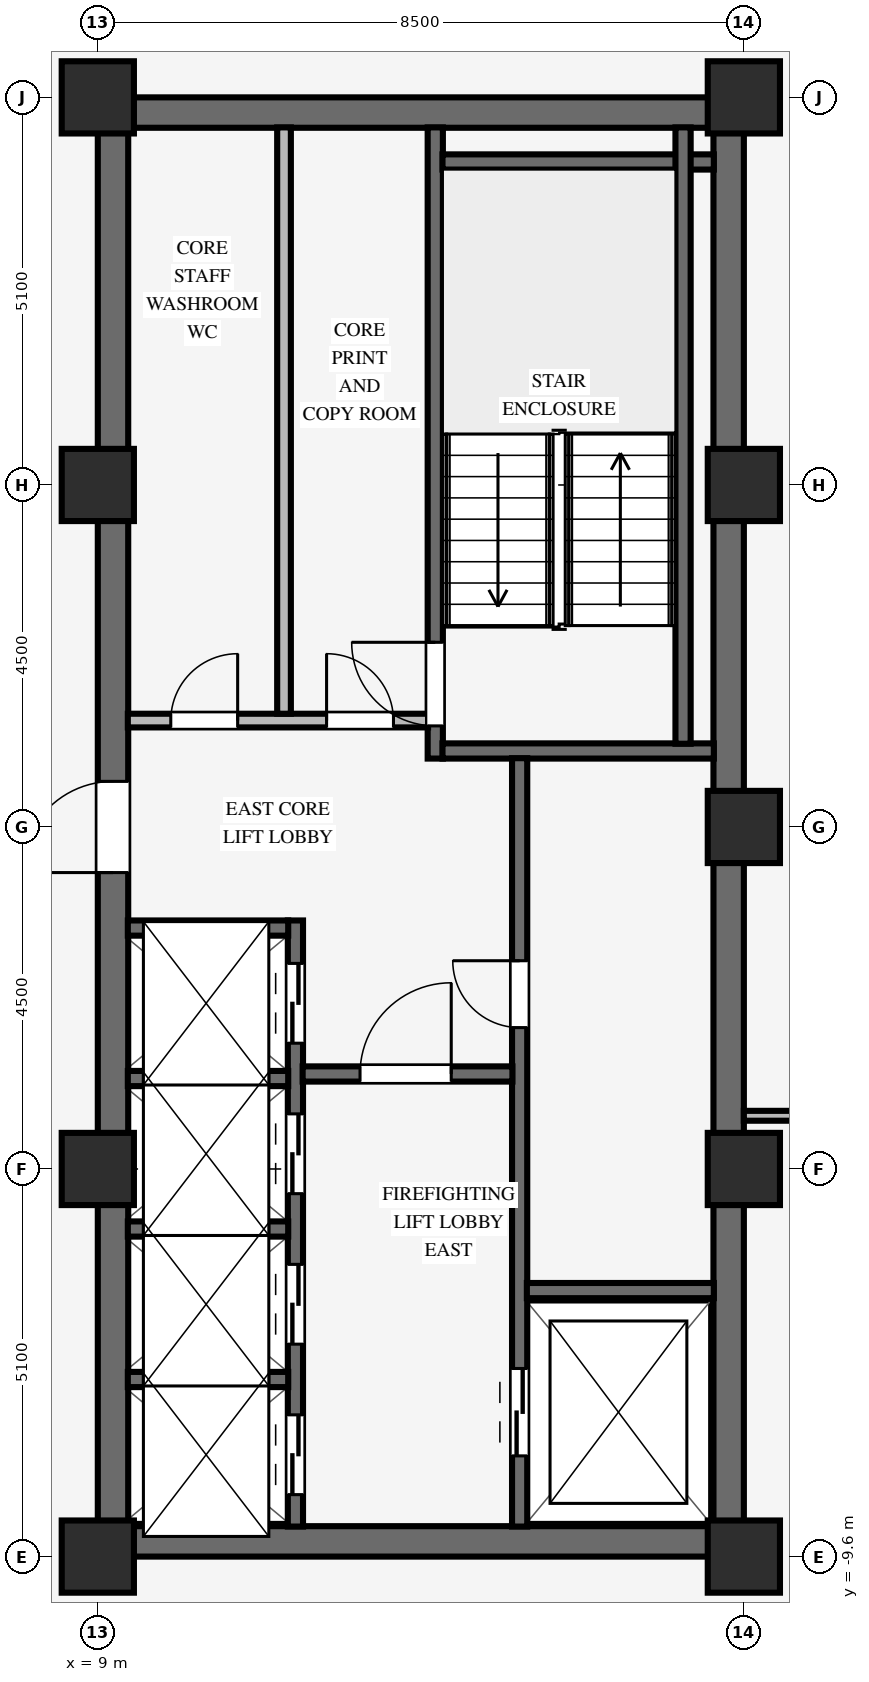
"""IFC4 building model, lengths in metres.
Left out: names, types, materials, properties, quantities, classifications, styles, units other than length and angle.
Written with IfcOpenShell. Run it as: python <this file> out.ifc"""

import sys

from ifc_helpers import new_model, si_unit, direction, frame, frame_2d, origin, origin_2d, place, context, subcontext, project, spatial, rectangle, extrude, source, transform, mapped, element, fill, save


model = new_model("IFC4")
c1 = context("Model", 3, precision=1e-05, world=origin(), true_north=direction((0.0, 1.0)))
c2 = subcontext(c1, "Body", "Model", "MODEL_VIEW")
j1 = project(units=[si_unit("LENGTHUNIT", "METRE"), si_unit("PLANEANGLEUNIT", "RADIAN")], contexts=[c1])
p1 = place(None, origin())
s1 = spatial("IfcSite", under=j1, at=p1, CompositionType="ELEMENT")
p2 = place(p1, origin())
s2 = spatial("IfcBuilding", under=s1, at=p2, CompositionType="ELEMENT")
p3 = place(p2, frame((0.0, 0.0, 167.65)))
s3 = spatial("IfcBuildingStorey", under=s2, at=p3, CompositionType="ELEMENT", Elevation=167.65)
for number, where, z_axis, x_axis in (
    (1, (9.0, -9.4, 0.0), (0.0, 0.0, 1.0), (1.0, 0.0, 0.0)),
    (2, (9.0, 9.4, 0.0), (0.0, 0.0, 1.0), (1.0, 0.0, 0.0)),
):
    element("IfcWall", number, at=place(p3, frame(where, z_axis=z_axis, x_axis=x_axis)), inside=s3, PredefinedType="SHEAR", context=c2, shape_type="SweptSolid", body=[
        extrude(rectangle(XDim=8.5, YDim=0.4, at=frame_2d((4.25, 0.0))), origin(), (0.0, 0.0, 1.0), 3.37),
    ])
p4 = place(p3, frame((9.2, -9.205, 0.0), z_axis=(0.0, 0.0, 1.0), x_axis=(0.0, 1.0, 0.0)))
e3 = element("IfcWall", 3, at=p4, inside=s3, PredefinedType="SHEAR", context=c2, shape_type="SweptSolid", body=[
    extrude(rectangle(XDim=18.41, YDim=0.4, at=frame_2d((9.205, 0.0))), origin(), (0.0, 0.0, 1.0), 3.37),
])
p5 = place(p4, frame((8.605, 0.0, 0.0)))
e4 = element("IfcOpeningElement", 4, at=p5, cuts=e3, PredefinedType="OPENING", context=c2, shape_type="SweptSolid", body=[
    extrude(rectangle(XDim=1.2, YDim=2.15, at=frame_2d((0.6, 1.075))), frame((0.0, 0.21, 0.0), z_axis=(0.0, -1.0, 0.0), x_axis=(1.0, 0.0, 0.0)), (0.0, 0.0, 1.0), 0.42),
])
p6 = place(p3, frame((17.3, -9.205, 0.0), z_axis=(0.0, 0.0, 1.0), x_axis=(0.0, 1.0, 0.0)))
e5 = element("IfcWall", 5, at=p6, inside=s3, PredefinedType="SHEAR", context=c2, shape_type="SweptSolid", body=[
    extrude(rectangle(XDim=18.41, YDim=0.4, at=frame_2d((9.205, 0.0))), origin(), (0.0, 0.0, 1.0), 3.37),
])
for number, where, z_axis, x_axis in (
    (6, (9.0, -9.6, 0.0), (0.0, 0.0, 1.0), (1.0, 0.0, 0.0)),
    (7, (9.0, -4.5, 0.0), (0.0, 0.0, 1.0), (1.0, 0.0, 0.0)),
    (8, (9.0, 4.5, 0.0), (0.0, 0.0, 1.0), (1.0, 0.0, 0.0)),
    (9, (9.0, 9.6, 0.0), (0.0, 0.0, 1.0), (1.0, 0.0, 0.0)),
    (10, (17.5, -9.6, 0.0), (0.0, 0.0, 1.0), (1.0, 0.0, 0.0)),
    (11, (17.5, -4.5, 0.0), (0.0, 0.0, 1.0), (1.0, 0.0, 0.0)),
    (12, (17.5, 4.5, 0.0), (0.0, 0.0, 1.0), (1.0, 0.0, 0.0)),
    (13, (17.5, 9.6, 0.0), (0.0, 0.0, 1.0), (1.0, 0.0, 0.0)),
    (14, (17.5, 0.0, 0.0), (0.0, 0.0, 1.0), (1.0, 0.0, 0.0)),
):
    element("IfcColumn", number, at=place(p3, frame(where, z_axis=z_axis, x_axis=x_axis)), inside=s3, PredefinedType="COLUMN", context=c2, shape_type="SweptSolid", body=[
        extrude(rectangle(XDim=0.95, YDim=0.95, at=origin_2d()), origin(), (0.0, 0.0, 1.0), 3.37),
    ])
p7 = place(p3, frame((13.44, 0.9, 0.0), z_axis=(0.0, 0.0, 1.0), x_axis=(0.0, 1.0, 0.0)))
e15 = element("IfcWall", 15, at=p7, inside=s3, PredefinedType="SHEAR", context=c2, shape_type="SweptSolid", body=[
    extrude(rectangle(XDim=8.305, YDim=0.2, at=frame_2d((4.153, 0.0))), origin(), (0.0, 0.0, 1.0), 3.37),
])
p8 = place(p7, frame((0.43, 0.0, 0.0)))
e16 = element("IfcOpeningElement", 16, at=p8, cuts=e15, PredefinedType="OPENING", context=c2, shape_type="SweptSolid", body=[
    extrude(rectangle(XDim=1.1, YDim=2.15, at=frame_2d((0.55, 1.075))), frame((0.0, 0.11, 0.0), z_axis=(0.0, -1.0, 0.0), x_axis=(1.0, 0.0, 0.0)), (0.0, 0.0, 1.0), 0.22),
])
for number, where, z_axis, x_axis in (
    (17, (13.535, 1.0, 0.0), (0.0, 0.0, 1.0), (1.0, 0.0, 0.0)),
    (18, (13.535, 8.75, 0.0), (0.0, 0.0, 1.0), (1.0, 0.0, 0.0)),
):
    element("IfcWall", number, at=place(p3, frame(where, z_axis=z_axis, x_axis=x_axis)), inside=s3, PredefinedType="SHEAR", context=c2, shape_type="SweptSolid", body=[
        extrude(rectangle(XDim=3.57, YDim=0.2, at=frame_2d((1.785, 0.0))), origin(), (0.0, 0.0, 1.0), 3.37),
    ])
p9 = place(p3, frame((16.7, 1.095, 0.0), z_axis=(0.0, 0.0, 1.0), x_axis=(0.0, 1.0, 0.0)))
e19 = element("IfcWall", 19, at=p9, inside=s3, PredefinedType="SHEAR", context=c2, shape_type="SweptSolid", body=[
    extrude(rectangle(XDim=8.11, YDim=0.2, at=frame_2d((4.055, 0.0))), origin(), (0.0, 0.0, 1.0), 3.37),
])
p10 = place(p3, frame((14.55, -9.205, 0.0), z_axis=(0.0, 0.0, 1.0), x_axis=(0.0, 1.0, 0.0)))
e20 = element("IfcWall", 20, at=p10, inside=s3, PredefinedType="SHEAR", context=c2, shape_type="SweptSolid", body=[
    extrude(rectangle(XDim=10.11, YDim=0.2, at=frame_2d((5.055, 0.0))), origin(), (0.0, 0.0, 1.0), 3.37),
])
p11 = place(p10, frame((6.565, 0.0, 0.0)))
e21 = element("IfcOpeningElement", 21, at=p11, cuts=e20, PredefinedType="OPENING", context=c2, shape_type="SweptSolid", body=[
    extrude(rectangle(XDim=0.88, YDim=2.1, at=frame_2d((0.44, 1.05))), frame((0.0, 0.11, 0.0), z_axis=(0.0, -1.0, 0.0), x_axis=(1.0, 0.0, 0.0)), (0.0, 0.0, 1.0), 0.22),
])
p12 = place(p10, frame((0.93, 0.0, 0.0)))
e22 = element("IfcOpeningElement", 22, at=p12, cuts=e20, PredefinedType="OPENING", context=c2, shape_type="SweptSolid", body=[
    extrude(rectangle(XDim=1.15, YDim=2.15, at=frame_2d((0.575, 1.075))), frame((0.0, 0.11, 0.0), z_axis=(0.0, -1.0, 0.0), x_axis=(1.0, 0.0, 0.0)), (0.0, 0.0, 1.0), 0.22),
])
p13 = place(p3, frame((14.645, -6.1, 0.0), z_axis=(0.0, 0.0, 1.0), x_axis=(1.0, 0.0, 0.0)))
e23 = element("IfcWall", 23, at=p13, inside=s3, PredefinedType="SHEAR", context=c2, shape_type="SweptSolid", body=[
    extrude(rectangle(XDim=2.46, YDim=0.2, at=frame_2d((1.23, 0.0))), origin(), (0.0, 0.0, 1.0), 3.37),
])
p14 = place(p3, frame((11.6, -9.205, 0.0), z_axis=(0.0, 0.0, 1.0), x_axis=(0.0, 1.0, 0.0)))
e24 = element("IfcWall", 24, at=p14, inside=s3, PredefinedType="SHEAR", context=c2, shape_type="SweptSolid", body=[
    extrude(rectangle(XDim=7.975, YDim=0.2, at=frame_2d((3.988, 0.0))), origin(), (0.0, 0.0, 1.0), 3.37),
])
p15 = place(p14, frame((0.42, 0.0, 0.0)))
e25 = element("IfcOpeningElement", 25, at=p15, cuts=e24, PredefinedType="OPENING", context=c2, shape_type="SweptSolid", body=[
    extrude(rectangle(XDim=1.05, YDim=2.15, at=frame_2d((0.525, 1.075))), frame((0.0, 0.11, 0.0), z_axis=(0.0, -1.0, 0.0), x_axis=(1.0, 0.0, 0.0)), (0.0, 0.0, 1.0), 0.22),
])
p16 = place(p14, frame((2.4, 0.0, 0.0)))
e26 = element("IfcOpeningElement", 26, at=p16, cuts=e24, PredefinedType="OPENING", context=c2, shape_type="SweptSolid", body=[
    extrude(rectangle(XDim=1.05, YDim=2.15, at=frame_2d((0.525, 1.075))), frame((0.0, 0.11, 0.0), z_axis=(0.0, -1.0, 0.0), x_axis=(1.0, 0.0, 0.0)), (0.0, 0.0, 1.0), 0.22),
])
p17 = place(p14, frame((4.38, 0.0, 0.0)))
e27 = element("IfcOpeningElement", 27, at=p17, cuts=e24, PredefinedType="OPENING", context=c2, shape_type="SweptSolid", body=[
    extrude(rectangle(XDim=1.05, YDim=2.15, at=frame_2d((0.525, 1.075))), frame((0.0, 0.11, 0.0), z_axis=(0.0, -1.0, 0.0), x_axis=(1.0, 0.0, 0.0)), (0.0, 0.0, 1.0), 0.22),
])
p18 = place(p14, frame((6.36, 0.0, 0.0)))
e28 = element("IfcOpeningElement", 28, at=p18, cuts=e24, PredefinedType="OPENING", context=c2, shape_type="SweptSolid", body=[
    extrude(rectangle(XDim=1.05, YDim=2.15, at=frame_2d((0.525, 1.075))), frame((0.0, 0.11, 0.0), z_axis=(0.0, -1.0, 0.0), x_axis=(1.0, 0.0, 0.0)), (0.0, 0.0, 1.0), 0.22),
])
p19 = place(p3, frame((11.695, -3.25, 0.0), z_axis=(0.0, 0.0, 1.0), x_axis=(1.0, 0.0, 0.0)))
e29 = element("IfcWall", 29, at=p19, inside=s3, PredefinedType="SHEAR", context=c2, shape_type="SweptSolid", body=[
    extrude(rectangle(XDim=2.76, YDim=0.2, at=frame_2d((1.38, 0.0))), origin(), (0.0, 0.0, 1.0), 3.37),
])
p20 = place(p19, frame((0.755, 0.0, 0.0)))
e30 = element("IfcOpeningElement", 30, at=p20, cuts=e29, PredefinedType="OPENING", context=c2, shape_type="SweptSolid", body=[
    extrude(rectangle(XDim=1.2, YDim=2.15, at=frame_2d((0.6, 1.075))), frame((0.0, 0.11, 0.0), z_axis=(0.0, -1.0, 0.0), x_axis=(1.0, 0.0, 0.0)), (0.0, 0.0, 1.0), 0.22),
])
for number, where, z_axis, x_axis in (
    (31, (9.395, -7.27, 0.0), (0.0, 0.0, 1.0), (1.0, 0.0, 0.0)),
    (32, (9.395, -5.29, 0.0), (0.0, 0.0, 1.0), (1.0, 0.0, 0.0)),
    (33, (9.395, -3.31, 0.0), (0.0, 0.0, 1.0), (1.0, 0.0, 0.0)),
    (34, (9.395, -1.33, 0.0), (0.0, 0.0, 1.0), (1.0, 0.0, 0.0)),
):
    element("IfcWall", number, at=place(p3, frame(where, z_axis=z_axis, x_axis=x_axis)), inside=s3, PredefinedType="SHEAR", context=c2, shape_type="SweptSolid", body=[
        extrude(rectangle(XDim=2.11, YDim=0.2, at=frame_2d((1.055, 0.0))), origin(), (0.0, 0.0, 1.0), 3.37),
    ])
p21 = place(p3, frame((9.395, 1.4, 0.0), z_axis=(0.0, 0.0, 1.0), x_axis=(1.0, 0.0, 0.0)))
e35 = element("IfcWall", 35, at=p21, inside=s3, PredefinedType="PARTITIONING", context=c2, shape_type="SweptSolid", body=[
    extrude(rectangle(XDim=3.95, YDim=0.18, at=frame_2d((1.975, 0.0))), origin(), (0.0, 0.0, 1.0), 3.36),
])
p22 = place(p21, frame((0.565, 0.0, 0.0)))
e36 = element("IfcOpeningElement", 36, at=p22, cuts=e35, PredefinedType="OPENING", context=c2, shape_type="SweptSolid", body=[
    extrude(rectangle(XDim=0.88, YDim=2.1, at=frame_2d((0.44, 1.05))), frame((0.0, 0.1, 0.0), z_axis=(0.0, -1.0, 0.0), x_axis=(1.0, 0.0, 0.0)), (0.0, 0.0, 1.0), 0.2),
])
p23 = place(p21, frame((2.615, 0.0, 0.0)))
e37 = element("IfcOpeningElement", 37, at=p23, cuts=e35, PredefinedType="OPENING", context=c2, shape_type="SweptSolid", body=[
    extrude(rectangle(XDim=0.88, YDim=2.1, at=frame_2d((0.44, 1.05))), frame((0.0, 0.1, 0.0), z_axis=(0.0, -1.0, 0.0), x_axis=(1.0, 0.0, 0.0)), (0.0, 0.0, 1.0), 0.2),
])
p24 = place(p3, frame((11.45, 1.49, 0.0), z_axis=(0.0, 0.0, 1.0), x_axis=(0.0, 1.0, 0.0)))
e38 = element("IfcWall", 38, at=p24, inside=s3, PredefinedType="PARTITIONING", context=c2, shape_type="SweptSolid", body=[
    extrude(rectangle(XDim=7.715, YDim=0.18, at=frame_2d((3.857, 0.0))), origin(), (0.0, 0.0, 1.0), 3.36),
])
p25 = place(p3, frame((17.5, -3.8, 0.0), z_axis=(0.0, 0.0, 1.0), x_axis=(1.0, 0.0, 0.0)))
e39 = element("IfcWall", 39, at=p25, inside=s3, PredefinedType="PARTITIONING", context=c2, shape_type="SweptSolid", body=[
    extrude(rectangle(XDim=4.79, YDim=0.13, at=frame_2d((2.395, 0.0))), origin(), (0.0, 0.0, 1.0), 3.36),
])
m1 = source(origin(), c2, "Body", "SweptSolid", [
    extrude(rectangle(XDim=1.1, YDim=2.15, at=frame_2d((0.55, 1.075))), frame((0.0, 0.025, 0.0), z_axis=(0.0, -1.0, 0.0), x_axis=(1.0, 0.0, 0.0)), (0.0, 0.0, 1.0), 0.05),
])
p26 = place(p8, origin())
e40 = element("IfcDoor", 40, at=p26, inside=s3, OperationType="SINGLE_SWING_RIGHT", PredefinedType="DOOR", context=c2, shape_type="MappedRepresentation", body=[
    mapped(m1, transform((0.0, 0.0, 0.0), scale=1.0)),
])
fill(e16, e40)
m2 = source(origin(), c2, "Body", "SweptSolid", [
    extrude(rectangle(XDim=0.88, YDim=2.1, at=frame_2d((0.44, 1.05))), frame((0.0, 0.025, 0.0), z_axis=(0.0, -1.0, 0.0), x_axis=(1.0, 0.0, 0.0)), (0.0, 0.0, 1.0), 0.05),
])
p27 = place(p11, origin())
e41 = element("IfcDoor", 41, at=p27, inside=s3, OperationType="SINGLE_SWING_RIGHT", PredefinedType="DOOR", context=c2, shape_type="MappedRepresentation", body=[
    mapped(m2, transform((0.0, 0.0, 0.0), scale=1.0)),
])
fill(e21, e41)
m3 = source(origin(), c2, "Body", "SweptSolid", [
    extrude(rectangle(XDim=1.2, YDim=2.15, at=frame_2d((0.6, 1.075))), frame((0.0, 0.025, 0.0), z_axis=(0.0, -1.0, 0.0), x_axis=(1.0, 0.0, 0.0)), (0.0, 0.0, 1.0), 0.05),
])
p28 = place(p20, origin())
e42 = element("IfcDoor", 42, at=p28, inside=s3, OperationType="SINGLE_SWING_RIGHT", PredefinedType="DOOR", context=c2, shape_type="MappedRepresentation", body=[
    mapped(m3, transform((0.0, 0.0, 0.0), scale=1.0)),
])
fill(e30, e42)
p29 = place(p5, origin())
e43 = element("IfcDoor", 43, at=p29, inside=s3, OperationType="SINGLE_SWING_LEFT", PredefinedType="DOOR", context=c2, shape_type="MappedRepresentation", body=[
    mapped(m3, transform((0.0, 0.0, 0.0), scale=1.0)),
])
fill(e4, e43)
p30 = place(p22, origin())
e44 = element("IfcDoor", 44, at=p30, inside=s3, OperationType="SINGLE_SWING_RIGHT", PredefinedType="DOOR", context=c2, shape_type="MappedRepresentation", body=[
    mapped(m2, transform((0.0, 0.0, 0.0), scale=1.0)),
])
fill(e36, e44)
p31 = place(p23, origin())
e45 = element("IfcDoor", 45, at=p31, inside=s3, OperationType="SINGLE_SWING_LEFT", PredefinedType="DOOR", context=c2, shape_type="MappedRepresentation", body=[
    mapped(m2, transform((0.0, 0.0, 0.0), scale=1.0)),
])
fill(e37, e45)
m4 = source(origin(), c2, "Body", "SweptSolid", [
    extrude(rectangle(XDim=1.15, YDim=2.15, at=frame_2d((0.575, 1.075))), frame((0.0, 0.025, 0.0), z_axis=(0.0, -1.0, 0.0), x_axis=(1.0, 0.0, 0.0)), (0.0, 0.0, 1.0), 0.05),
])
p32 = place(p12, origin())
e46 = element("IfcDoor", 46, at=p32, inside=s3, OperationType="DOUBLE_DOOR_SLIDING", PredefinedType="DOOR", context=c2, shape_type="MappedRepresentation", body=[
    mapped(m4, transform((0.0, 0.0, 0.0), scale=1.0)),
])
fill(e22, e46)
m5 = source(origin(), c2, "Body", "SweptSolid", [
    extrude(rectangle(XDim=1.05, YDim=2.15, at=frame_2d((0.525, 1.075))), frame((0.0, 0.025, 0.0), z_axis=(0.0, -1.0, 0.0), x_axis=(1.0, 0.0, 0.0)), (0.0, 0.0, 1.0), 0.05),
])
p33 = place(p15, origin())
e47 = element("IfcDoor", 47, at=p33, inside=s3, OperationType="DOUBLE_DOOR_SLIDING", PredefinedType="DOOR", context=c2, shape_type="MappedRepresentation", body=[
    mapped(m5, transform((0.0, 0.0, 0.0), scale=1.0)),
])
fill(e25, e47)
p34 = place(p16, origin())
e48 = element("IfcDoor", 48, at=p34, inside=s3, OperationType="DOUBLE_DOOR_SLIDING", PredefinedType="DOOR", context=c2, shape_type="MappedRepresentation", body=[
    mapped(m5, transform((0.0, 0.0, 0.0), scale=1.0)),
])
fill(e26, e48)
p35 = place(p17, origin())
e49 = element("IfcDoor", 49, at=p35, inside=s3, OperationType="DOUBLE_DOOR_SLIDING", PredefinedType="DOOR", context=c2, shape_type="MappedRepresentation", body=[
    mapped(m5, transform((0.0, 0.0, 0.0), scale=1.0)),
])
fill(e27, e49)
p36 = place(p18, origin())
e50 = element("IfcDoor", 50, at=p36, inside=s3, OperationType="DOUBLE_DOOR_SLIDING", PredefinedType="DOOR", context=c2, shape_type="MappedRepresentation", body=[
    mapped(m5, transform((0.0, 0.0, 0.0), scale=1.0)),
])
fill(e28, e50)
save(model, sys.argv[1])
